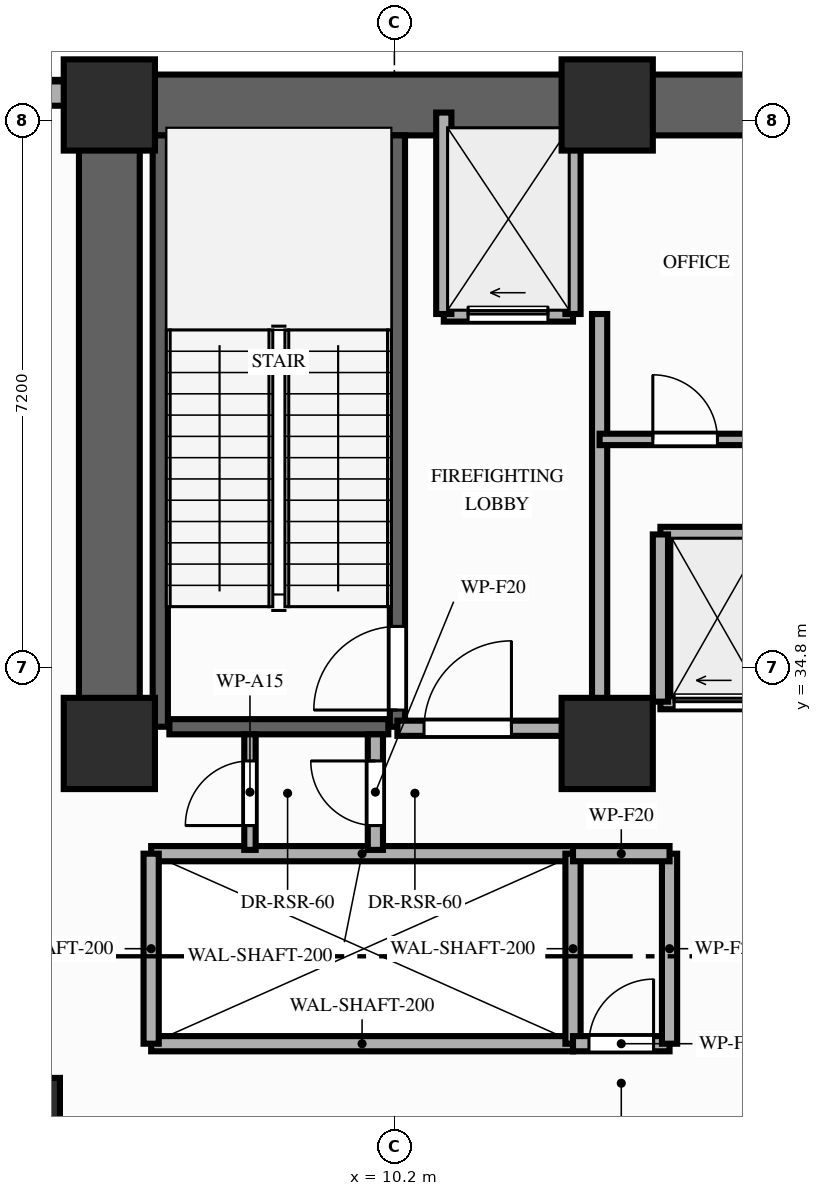
"""IFC4 building model, lengths in metres.
Left out: names, types, materials, properties, quantities, classifications, styles, units other than length and angle.
Written with IfcOpenShell. Run it as: python <this file> out.ifc"""

import sys

from ifc_helpers import new_model, si_unit, direction, frame, frame_2d, origin, origin_2d, place, context, subcontext, project, spatial, rectangle, extrude, element, fill, save


model = new_model("IFC4")
c1 = context("Model", 3, precision=1e-05, world=origin(), true_north=direction((0.0, 1.0)))
c2 = subcontext(c1, "Body", "Model", "MODEL_VIEW")
j1 = project(units=[si_unit("LENGTHUNIT", "METRE"), si_unit("PLANEANGLEUNIT", "RADIAN")], contexts=[c1])
p1 = place(None, origin())
s1 = spatial("IfcSite", under=j1, at=p1, CompositionType="ELEMENT")
p2 = place(p1, origin())
s2 = spatial("IfcBuilding", under=s1, at=p2, CompositionType="ELEMENT")
p3 = place(p2, frame((0.0, 0.0, 102.6)))
s3 = spatial("IfcBuildingStorey", under=s2, at=p3, CompositionType="ELEMENT", Elevation=102.6)
for number, where, z_axis, x_axis in (
    (1, (6.45, 33.8, 0.0), (0.0, 0.0, 1.0), (1.0, 0.0, 0.0)),
    (2, (13.0, 33.8, 0.0), (0.0, 0.0, 1.0), (1.0, 0.0, 0.0)),
    (3, (6.45, 42.2, 0.0), (0.0, 0.0, 1.0), (1.0, 0.0, 0.0)),
    (4, (13.0, 42.2, 0.0), (0.0, 0.0, 1.0), (1.0, 0.0, 0.0)),
):
    element("IfcColumn", number, at=place(p3, frame(where, z_axis=z_axis, x_axis=x_axis)), inside=s3, PredefinedType="COLUMN", context=c2, shape_type="SweptSolid", body=[
        extrude(rectangle(XDim=1.2, YDim=1.2, at=origin_2d()), origin(), (0.0, 0.0, 1.0), 4.8),
    ])
p4 = place(p3, frame((5.4, 28.8, 0.0), z_axis=(0.0, 0.0, 1.0), x_axis=(1.0, 0.0, 0.0)))
e5 = element("IfcColumn", 5, at=p4, inside=s3, PredefinedType="COLUMN", context=c2, shape_type="SweptSolid", body=[
    extrude(rectangle(XDim=0.8, YDim=1.2, at=origin_2d()), origin(), (0.0, 0.0, 1.0), 4.8),
])
p5 = place(p3, frame((6.0, 42.35, 0.0), z_axis=(0.0, 0.0, 1.0), x_axis=(-1.0, 0.0, 0.0)))
e6 = element("IfcWall", 6, at=p5, inside=s3, PredefinedType="STANDARD", context=c2, shape_type="SweptSolid", body=[
    extrude(rectangle(XDim=2.0, YDim=0.32, at=frame_2d((1.0, 0.0))), origin(), (0.0, 0.0, 1.0), 4.56),
])
p6 = place(p3, frame((6.45, 42.2, 0.0), z_axis=(0.0, 0.0, 1.0), x_axis=(1.0, 0.0, 0.0)))
e7 = element("IfcWall", 7, at=p6, inside=s3, PredefinedType="SHEAR", context=c2, shape_type="SweptSolid", body=[
    extrude(rectangle(XDim=20.45, YDim=0.8, at=frame_2d((10.225, 0.0))), origin(), (0.0, 0.0, 1.0), 4.56),
])
p7 = place(p3, frame((6.45, 33.8, 0.0), z_axis=(0.0, 0.0, 1.0), x_axis=(0.0, 1.0, 0.0)))
e8 = element("IfcWall", 8, at=p7, inside=s3, PredefinedType="SHEAR", context=c2, shape_type="SweptSolid", body=[
    extrude(rectangle(XDim=7.95, YDim=0.8, at=frame_2d((3.975, 0.0))), origin(), (0.0, 0.0, 1.0), 4.56),
])
p8 = place(p3, frame((7.12, 34.02, 0.0), z_axis=(0.0, 0.0, 1.0), x_axis=(0.0, 1.0, 0.0)))
e9 = element("IfcWall", 9, at=p8, inside=s3, PredefinedType="SHEAR", context=c2, shape_type="SweptSolid", body=[
    extrude(rectangle(XDim=7.78, YDim=0.2, at=frame_2d((3.89, 0.0))), origin(), (0.0, 0.0, 1.0), 4.56),
])
p9 = place(p3, frame((10.24, 34.02, 0.0), z_axis=(0.0, 0.0, 1.0), x_axis=(0.0, 1.0, 0.0)))
e10 = element("IfcWall", 10, at=p9, inside=s3, PredefinedType="SHEAR", context=c2, shape_type="SweptSolid", body=[
    extrude(rectangle(XDim=7.78, YDim=0.2, at=frame_2d((3.89, 0.0))), origin(), (0.0, 0.0, 1.0), 4.56),
])
p10 = place(p9, frame((0.22, 0.0, 0.0)))
e11 = element("IfcOpeningElement", 11, at=p10, cuts=e10, PredefinedType="OPENING", context=c2, shape_type="SweptSolid", body=[
    extrude(rectangle(XDim=1.1, YDim=2.15, at=frame_2d((0.55, 1.075))), frame((0.0, 0.11, 0.0), z_axis=(0.0, -1.0, 0.0), x_axis=(1.0, 0.0, 0.0)), (0.0, 0.0, 1.0), 0.22),
])
p11 = place(p3, frame((7.24, 34.02, 0.0), z_axis=(0.0, 0.0, 1.0), x_axis=(1.0, 0.0, 0.0)))
e12 = element("IfcWall", 12, at=p11, inside=s3, PredefinedType="SHEAR", context=c2, shape_type="SweptSolid", body=[
    extrude(rectangle(XDim=2.88, YDim=0.2, at=frame_2d((1.44, 0.0))), origin(), (0.0, 0.0, 1.0), 4.56),
])
for number, where, z_axis, x_axis in (
    (13, (7.0, 29.85, 0.0), (0.0, 0.0, 1.0), (1.0, 0.0, 0.0)),
    (14, (7.0, 32.35, 0.0), (0.0, 0.0, 1.0), (1.0, 0.0, 0.0)),
):
    element("IfcWall", number, at=place(p3, frame(where, z_axis=z_axis, x_axis=x_axis)), inside=s3, PredefinedType="MOVABLE", context=c2, shape_type="SweptSolid", body=[
        extrude(rectangle(XDim=5.55, YDim=0.2, at=frame_2d((2.775, 0.0))), origin(), (0.0, 0.0, 1.0), 4.56),
    ])
for number, where, z_axis, x_axis in (
    (15, (7.0, 29.85, 0.0), (0.0, 0.0, 1.0), (0.0, 1.0, 0.0)),
    (16, (12.55, 29.85, 0.0), (0.0, 0.0, 1.0), (0.0, 1.0, 0.0)),
):
    element("IfcWall", number, at=place(p3, frame(where, z_axis=z_axis, x_axis=x_axis)), inside=s3, PredefinedType="MOVABLE", context=c2, shape_type="SweptSolid", body=[
        extrude(rectangle(XDim=2.5, YDim=0.2, at=frame_2d((1.25, 0.0))), origin(), (0.0, 0.0, 1.0), 4.56),
    ])
p12 = place(p3, frame((10.85, 39.45, 0.0), z_axis=(0.0, 0.0, 1.0), x_axis=(1.0, 0.0, 0.0)))
e17 = element("IfcWall", 17, at=p12, inside=s3, PredefinedType="MOVABLE", context=c2, shape_type="SweptSolid", body=[
    extrude(rectangle(XDim=1.7, YDim=0.2, at=frame_2d((0.85, 0.0))), origin(), (0.0, 0.0, 1.0), 4.56),
])
p13 = place(p12, frame((0.32, 0.0, 0.0)))
e18 = element("IfcOpeningElement", 18, at=p13, cuts=e17, PredefinedType="OPENING", context=c2, shape_type="SweptSolid", body=[
    extrude(rectangle(XDim=1.05, YDim=2.15, at=frame_2d((0.525, 1.075))), frame((0.0, 0.11, 0.0), z_axis=(0.0, -1.0, 0.0), x_axis=(1.0, 0.0, 0.0)), (0.0, 0.0, 1.0), 0.22),
])
for number, where, z_axis, x_axis in (
    (19, (10.85, 39.45, 0.0), (0.0, 0.0, 1.0), (0.0, 1.0, 0.0)),
    (20, (12.55, 39.45, 0.0), (0.0, 0.0, 1.0), (0.0, 1.0, 0.0)),
):
    element("IfcWall", number, at=place(p3, frame(where, z_axis=z_axis, x_axis=x_axis)), inside=s3, PredefinedType="MOVABLE", context=c2, shape_type="SweptSolid", body=[
        extrude(rectangle(XDim=2.65, YDim=0.2, at=frame_2d((1.325, 0.0))), origin(), (0.0, 0.0, 1.0), 3.95),
    ])
p14 = place(p3, frame((12.9, 34.0, 0.0), z_axis=(0.0, 0.0, 1.0), x_axis=(0.0, 1.0, 0.0)))
e21 = element("IfcWall", 21, at=p14, inside=s3, PredefinedType="PARTITIONING", context=c2, shape_type="SweptSolid", body=[
    extrude(rectangle(XDim=5.45, YDim=0.2, at=frame_2d((2.725, 0.0))), origin(), (0.0, 0.0, 1.0), 3.95),
])
p15 = place(p3, frame((10.24, 34.0, 0.0), z_axis=(0.0, 0.0, 1.0), x_axis=(1.0, 0.0, 0.0)))
e22 = element("IfcWall", 22, at=p15, inside=s3, PredefinedType="PARTITIONING", context=c2, shape_type="SweptSolid", body=[
    extrude(rectangle(XDim=2.66, YDim=0.2, at=frame_2d((1.33, 0.0))), origin(), (0.0, 0.0, 1.0), 3.95),
])
p16 = place(p15, frame((0.35, 0.0, 0.0)))
e23 = element("IfcOpeningElement", 23, at=p16, cuts=e22, PredefinedType="OPENING", context=c2, shape_type="SweptSolid", body=[
    extrude(rectangle(XDim=1.15, YDim=2.15, at=frame_2d((0.575, 1.075))), frame((0.0, 0.11, 0.0), z_axis=(0.0, -1.0, 0.0), x_axis=(1.0, 0.0, 0.0)), (0.0, 0.0, 1.0), 0.22),
])
p17 = place(p3, frame((9.95, 32.4, 0.0), z_axis=(0.0, 0.0, 1.0), x_axis=(0.0, 1.0, 0.0)))
e24 = element("IfcWall", 24, at=p17, inside=s3, PredefinedType="PARTITIONING", context=c2, shape_type="SweptSolid", body=[
    extrude(rectangle(XDim=1.52, YDim=0.2, at=frame_2d((0.76, 0.0))), origin(), (0.0, 0.0, 1.0), 3.95),
])
p18 = place(p17, frame((0.32, 0.0, 0.0)))
e25 = element("IfcOpeningElement", 25, at=p18, cuts=e24, PredefinedType="OPENING", context=c2, shape_type="SweptSolid", body=[
    extrude(rectangle(XDim=0.85, YDim=2.05, at=frame_2d((0.425, 1.025))), frame((0.0, 0.11, 0.0), z_axis=(0.0, -1.0, 0.0), x_axis=(1.0, 0.0, 0.0)), (0.0, 0.0, 1.0), 0.22),
])
p19 = place(p3, frame((8.3, 32.4, 0.0), z_axis=(0.0, 0.0, 1.0), x_axis=(0.0, 1.0, 0.0)))
e26 = element("IfcWall", 26, at=p19, inside=s3, PredefinedType="PARTITIONING", context=c2, shape_type="SweptSolid", body=[
    extrude(rectangle(XDim=1.52, YDim=0.15, at=frame_2d((0.76, 0.0))), origin(), (0.0, 0.0, 1.0), 3.95),
])
p20 = place(p19, frame((0.32, 0.0, 0.0)))
e27 = element("IfcOpeningElement", 27, at=p20, cuts=e26, PredefinedType="OPENING", context=c2, shape_type="SweptSolid", body=[
    extrude(rectangle(XDim=0.85, YDim=2.05, at=frame_2d((0.425, 1.025))), frame((0.0, 0.085, 0.0), z_axis=(0.0, -1.0, 0.0), x_axis=(1.0, 0.0, 0.0)), (0.0, 0.0, 1.0), 0.17),
])
p21 = place(p3, frame((12.55, 29.85, 0.0), z_axis=(0.0, 0.0, 1.0), x_axis=(1.0, 0.0, 0.0)))
e28 = element("IfcWall", 28, at=p21, inside=s3, PredefinedType="PARTITIONING", context=c2, shape_type="SweptSolid", body=[
    extrude(rectangle(XDim=1.27, YDim=0.2, at=frame_2d((0.635, 0.0))), origin(), (0.0, 0.0, 1.0), 4.56),
])
p22 = place(p21, frame((0.21, 0.0, 0.0)))
e29 = element("IfcOpeningElement", 29, at=p22, cuts=e28, PredefinedType="OPENING", context=c2, shape_type="SweptSolid", body=[
    extrude(rectangle(XDim=0.85, YDim=2.05, at=frame_2d((0.425, 1.025))), frame((0.0, 0.11, 0.0), z_axis=(0.0, -1.0, 0.0), x_axis=(1.0, 0.0, 0.0)), (0.0, 0.0, 1.0), 0.22),
])
p23 = place(p3, frame((13.82, 29.85, 0.0), z_axis=(0.0, 0.0, 1.0), x_axis=(0.0, 1.0, 0.0)))
e30 = element("IfcWall", 30, at=p23, inside=s3, PredefinedType="PARTITIONING", context=c2, shape_type="SweptSolid", body=[
    extrude(rectangle(XDim=2.5, YDim=0.2, at=frame_2d((1.25, 0.0))), origin(), (0.0, 0.0, 1.0), 4.56),
])
p24 = place(p3, frame((12.55, 32.35, 0.0), z_axis=(0.0, 0.0, 1.0), x_axis=(1.0, 0.0, 0.0)))
e31 = element("IfcWall", 31, at=p24, inside=s3, PredefinedType="PARTITIONING", context=c2, shape_type="SweptSolid", body=[
    extrude(rectangle(XDim=1.27, YDim=0.2, at=frame_2d((0.635, 0.0))), origin(), (0.0, 0.0, 1.0), 4.56),
])
p25 = place(p3, frame((12.9, 37.8, 0.0), z_axis=(0.0, 0.0, 1.0), x_axis=(1.0, 0.0, 0.0)))
e32 = element("IfcWall", 32, at=p25, inside=s3, PredefinedType="PARTITIONING", context=c2, shape_type="SweptSolid", body=[
    extrude(rectangle(XDim=7.6, YDim=0.15, at=frame_2d((3.8, 0.0))), origin(), (0.0, 0.0, 1.0), 4.56),
])
p26 = place(p25, frame((0.7, 0.0, 0.0)))
e33 = element("IfcOpeningElement", 33, at=p26, cuts=e32, PredefinedType="OPENING", context=c2, shape_type="SweptSolid", body=[
    extrude(rectangle(XDim=0.85, YDim=2.05, at=frame_2d((0.425, 1.025))), frame((0.0, 0.085, 0.0), z_axis=(0.0, -1.0, 0.0), x_axis=(1.0, 0.0, 0.0)), (0.0, 0.0, 1.0), 0.17),
])
p27 = place(p25, frame((3.25, 0.0, 0.0)))
e34 = element("IfcOpeningElement", 34, at=p27, cuts=e32, PredefinedType="OPENING", context=c2, shape_type="SweptSolid", body=[
    extrude(rectangle(XDim=0.85, YDim=2.05, at=frame_2d((0.425, 1.025))), frame((0.0, 0.085, 0.0), z_axis=(0.0, -1.0, 0.0), x_axis=(1.0, 0.0, 0.0)), (0.0, 0.0, 1.0), 0.17),
])
p28 = place(p25, frame((5.8, 0.0, 0.0)))
e35 = element("IfcOpeningElement", 35, at=p28, cuts=e32, PredefinedType="OPENING", context=c2, shape_type="SweptSolid", body=[
    extrude(rectangle(XDim=0.85, YDim=2.05, at=frame_2d((0.425, 1.025))), frame((0.0, 0.085, 0.0), z_axis=(0.0, -1.0, 0.0), x_axis=(1.0, 0.0, 0.0)), (0.0, 0.0, 1.0), 0.17),
])
p29 = place(p3, frame((13.7, 34.35, 0.0), z_axis=(0.0, 0.0, 1.0), x_axis=(1.0, 0.0, 0.0)))
e36 = element("IfcWall", 36, at=p29, inside=s3, PredefinedType="MOVABLE", context=c2, shape_type="SweptSolid", body=[
    extrude(rectangle(XDim=5.42, YDim=0.2, at=frame_2d((2.71, 0.0))), origin(), (0.0, 0.0, 1.0), 4.56),
])
p30 = place(p29, frame((0.18, 0.0, 0.0)))
e37 = element("IfcOpeningElement", 37, at=p30, cuts=e36, PredefinedType="OPENING", context=c2, shape_type="SweptSolid", body=[
    extrude(rectangle(XDim=1.05, YDim=2.15, at=frame_2d((0.525, 1.075))), frame((0.0, 0.11, 0.0), z_axis=(0.0, -1.0, 0.0), x_axis=(1.0, 0.0, 0.0)), (0.0, 0.0, 1.0), 0.22),
])
p31 = place(p29, frame((1.47, 0.0, 0.0)))
e38 = element("IfcOpeningElement", 38, at=p31, cuts=e36, PredefinedType="OPENING", context=c2, shape_type="SweptSolid", body=[
    extrude(rectangle(XDim=1.05, YDim=2.15, at=frame_2d((0.525, 1.075))), frame((0.0, 0.11, 0.0), z_axis=(0.0, -1.0, 0.0), x_axis=(1.0, 0.0, 0.0)), (0.0, 0.0, 1.0), 0.22),
])
p32 = place(p29, frame((2.78, 0.0, 0.0)))
e39 = element("IfcOpeningElement", 39, at=p32, cuts=e36, PredefinedType="OPENING", context=c2, shape_type="SweptSolid", body=[
    extrude(rectangle(XDim=1.05, YDim=2.15, at=frame_2d((0.525, 1.075))), frame((0.0, 0.11, 0.0), z_axis=(0.0, -1.0, 0.0), x_axis=(1.0, 0.0, 0.0)), (0.0, 0.0, 1.0), 0.22),
])
p33 = place(p29, frame((4.08, 0.0, 0.0)))
e40 = element("IfcOpeningElement", 40, at=p33, cuts=e36, PredefinedType="OPENING", context=c2, shape_type="SweptSolid", body=[
    extrude(rectangle(XDim=1.05, YDim=2.15, at=frame_2d((0.525, 1.075))), frame((0.0, 0.11, 0.0), z_axis=(0.0, -1.0, 0.0), x_axis=(1.0, 0.0, 0.0)), (0.0, 0.0, 1.0), 0.22),
])
p34 = place(p3, frame((13.7, 36.55, 0.0), z_axis=(0.0, 0.0, 1.0), x_axis=(1.0, 0.0, 0.0)))
e41 = element("IfcWall", 41, at=p34, inside=s3, PredefinedType="MOVABLE", context=c2, shape_type="SweptSolid", body=[
    extrude(rectangle(XDim=5.42, YDim=0.2, at=frame_2d((2.71, 0.0))), origin(), (0.0, 0.0, 1.0), 4.56),
])
p35 = place(p3, frame((13.7, 34.35, 0.0), z_axis=(0.0, 0.0, 1.0), x_axis=(0.0, 1.0, 0.0)))
e42 = element("IfcWall", 42, at=p35, inside=s3, PredefinedType="MOVABLE", context=c2, shape_type="SweptSolid", body=[
    extrude(rectangle(XDim=2.2, YDim=0.2, at=frame_2d((1.1, 0.0))), origin(), (0.0, 0.0, 1.0), 4.56),
])
p36 = place(p10, origin())
e43 = element("IfcDoor", 43, at=p36, inside=s3, OperationType="SINGLE_SWING_LEFT", PredefinedType="DOOR", context=c2, shape_type="SweptSolid", body=[
    extrude(rectangle(XDim=1.1, YDim=2.15, at=frame_2d((0.55, 1.075))), frame((0.0, 0.025, 0.0), z_axis=(0.0, -1.0, 0.0), x_axis=(1.0, 0.0, 0.0)), (0.0, 0.0, 1.0), 0.05),
])
fill(e11, e43)
p37 = place(p13, origin())
e44 = element("IfcDoor", 44, at=p37, inside=s3, OperationType="SLIDING_TO_LEFT", PredefinedType="DOOR", context=c2, shape_type="SweptSolid", body=[
    extrude(rectangle(XDim=1.05, YDim=2.15, at=frame_2d((0.525, 1.075))), frame((0.0, 0.025, 0.0), z_axis=(0.0, -1.0, 0.0), x_axis=(1.0, 0.0, 0.0)), (0.0, 0.0, 1.0), 0.05),
])
fill(e18, e44)
p38 = place(p16, origin())
e45 = element("IfcDoor", 45, at=p38, inside=s3, OperationType="SINGLE_SWING_RIGHT", PredefinedType="DOOR", context=c2, shape_type="SweptSolid", body=[
    extrude(rectangle(XDim=1.15, YDim=2.15, at=frame_2d((0.575, 1.075))), frame((0.0, 0.025, 0.0), z_axis=(0.0, -1.0, 0.0), x_axis=(1.0, 0.0, 0.0)), (0.0, 0.0, 1.0), 0.05),
])
fill(e23, e45)
p39 = place(p18, origin())
e46 = element("IfcDoor", 46, at=p39, inside=s3, OperationType="SINGLE_SWING_RIGHT", PredefinedType="DOOR", context=c2, shape_type="SweptSolid", body=[
    extrude(rectangle(XDim=0.85, YDim=2.05, at=frame_2d((0.425, 1.025))), frame((0.0, 0.025, 0.0), z_axis=(0.0, -1.0, 0.0), x_axis=(1.0, 0.0, 0.0)), (0.0, 0.0, 1.0), 0.05),
])
fill(e25, e46)
p40 = place(p20, origin())
e47 = element("IfcDoor", 47, at=p40, inside=s3, OperationType="SINGLE_SWING_LEFT", PredefinedType="DOOR", context=c2, shape_type="SweptSolid", body=[
    extrude(rectangle(XDim=0.85, YDim=2.05, at=frame_2d((0.425, 1.025))), frame((0.0, 0.025, 0.0), z_axis=(0.0, -1.0, 0.0), x_axis=(1.0, 0.0, 0.0)), (0.0, 0.0, 1.0), 0.05),
])
fill(e27, e47)
p41 = place(p22, origin())
e48 = element("IfcDoor", 48, at=p41, inside=s3, OperationType="SINGLE_SWING_RIGHT", PredefinedType="DOOR", context=c2, shape_type="SweptSolid", body=[
    extrude(rectangle(XDim=0.85, YDim=2.05, at=frame_2d((0.425, 1.025))), frame((0.0, 0.025, 0.0), z_axis=(0.0, -1.0, 0.0), x_axis=(1.0, 0.0, 0.0)), (0.0, 0.0, 1.0), 0.05),
])
fill(e29, e48)
p42 = place(p26, origin())
e49 = element("IfcDoor", 49, at=p42, inside=s3, OperationType="SINGLE_SWING_LEFT", PredefinedType="DOOR", context=c2, shape_type="SweptSolid", body=[
    extrude(rectangle(XDim=0.85, YDim=2.05, at=frame_2d((0.425, 1.025))), frame((0.0, 0.025, 0.0), z_axis=(0.0, -1.0, 0.0), x_axis=(1.0, 0.0, 0.0)), (0.0, 0.0, 1.0), 0.05),
])
fill(e33, e49)
p43 = place(p30, origin())
e50 = element("IfcDoor", 50, at=p43, inside=s3, OperationType="SLIDING_TO_LEFT", PredefinedType="DOOR", context=c2, shape_type="SweptSolid", body=[
    extrude(rectangle(XDim=1.05, YDim=2.15, at=frame_2d((0.525, 1.075))), frame((0.0, 0.025, 0.0), z_axis=(0.0, -1.0, 0.0), x_axis=(1.0, 0.0, 0.0)), (0.0, 0.0, 1.0), 0.05),
])
fill(e37, e50)
save(model, sys.argv[1])
